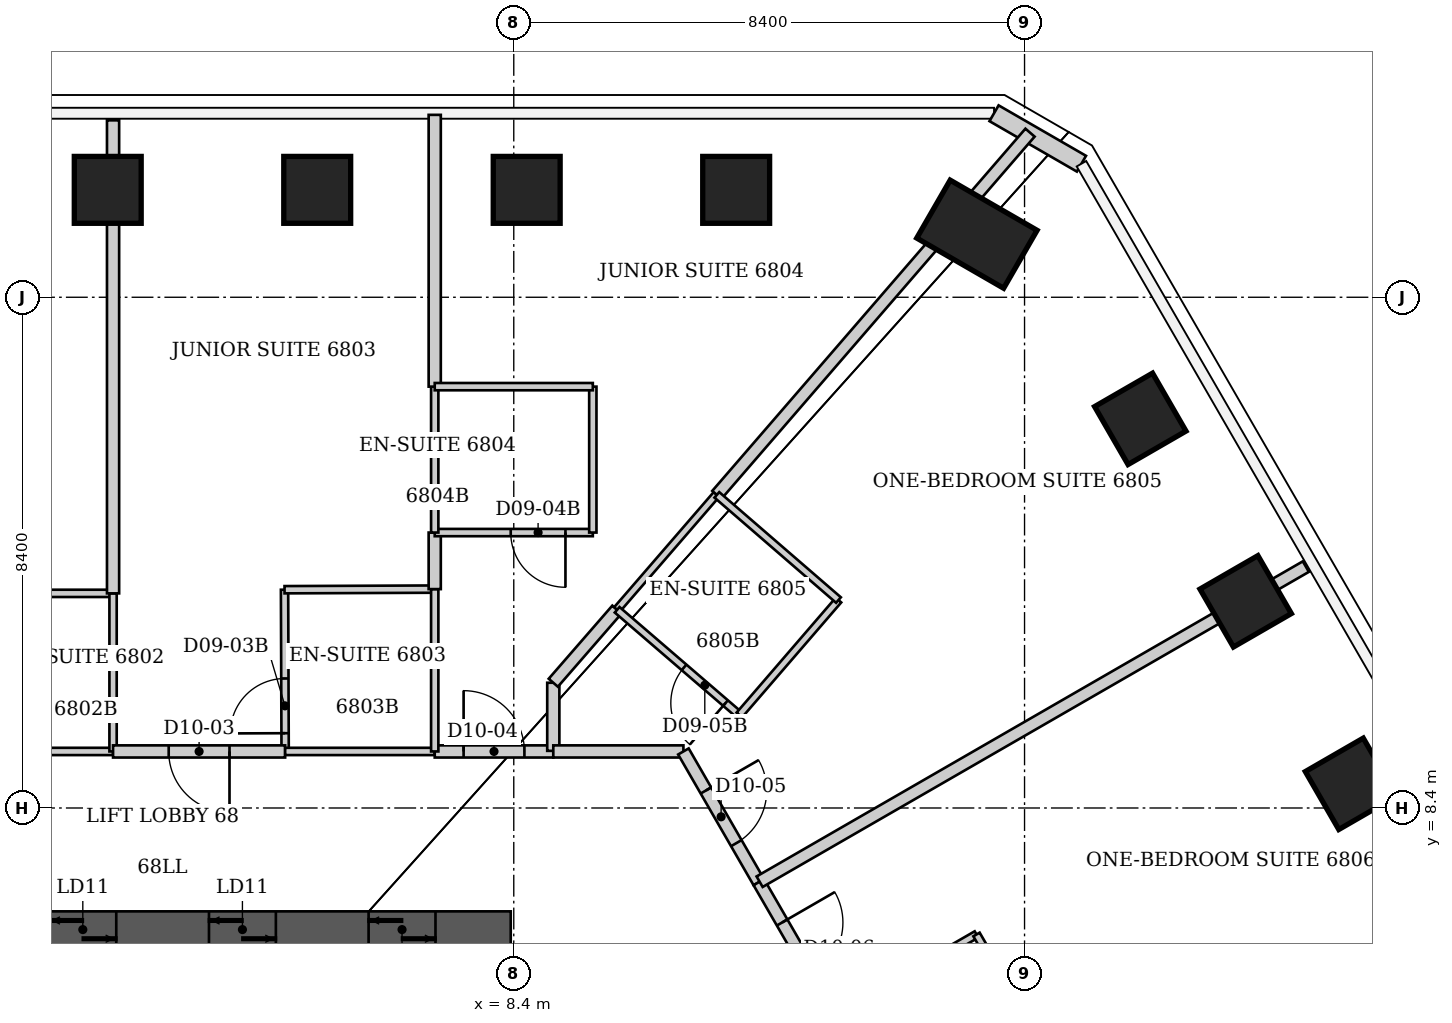
"""IFC4 building model, lengths in metres.
Left out: names, types, materials, properties, quantities, classifications, styles, units other than length and angle.
Written with IfcOpenShell. Run it as: python <this file> out.ifc"""

import sys

from ifc_helpers import new_model, si_unit, direction, frame, frame_2d, origin, origin_2d, place, context, subcontext, project, spatial, rectangle, extrude, element, fill, save


model = new_model("IFC4")
c1 = context("Model", 3, precision=1e-05, world=origin(), true_north=direction((0.0, 1.0)))
c2 = subcontext(c1, "Body", "Model", "MODEL_VIEW")
j1 = project(units=[si_unit("LENGTHUNIT", "METRE"), si_unit("PLANEANGLEUNIT", "RADIAN")], contexts=[c1])
p1 = place(None, origin())
s1 = spatial("IfcSite", under=j1, at=p1, CompositionType="ELEMENT")
p2 = place(p1, origin())
s2 = spatial("IfcBuilding", under=s1, at=p2, CompositionType="ELEMENT")
p3 = place(p2, frame((0.0, 0.0, 272.2)))
s3 = spatial("IfcBuildingStorey", under=s2, at=p3, CompositionType="ELEMENT", Elevation=272.2)
for number, where, z_axis, x_axis in (
    (1, (1.722, 18.566, 0.0), (0.0, 0.0, 1.0), (0.0, 1.0, 0.0)),
    (2, (5.167, 18.566, 0.0), (0.0, 0.0, 1.0), (0.0, 1.0, 0.0)),
    (3, (8.613, 18.566, 0.0), (0.0, 0.0, 1.0), (0.0, 1.0, 0.0)),
    (4, (12.058, 18.566, 0.0), (0.0, 0.0, 1.0), (0.0, 1.0, 0.0)),
):
    element("IfcColumn", number, at=place(p3, frame(where, z_axis=z_axis, x_axis=x_axis)), inside=s3, PredefinedType="COLUMN", context=c2, shape_type="SweptSolid", body=[
        extrude(rectangle(XDim=1.1, YDim=1.1, at=origin_2d()), origin(), (0.0, 0.0, 1.0), 3.8),
    ])
p4 = place(p3, frame((16.017, 17.837, 0.0), z_axis=(0.0, 0.0, 1.0), x_axis=(0.5, 0.866025403784, 0.0)))
e5 = element("IfcColumn", 5, at=p4, inside=s3, PredefinedType="COLUMN", context=c2, shape_type="SweptSolid", body=[
    extrude(rectangle(XDim=1.1, YDim=1.65, at=origin_2d()), origin(), (0.0, 0.0, 1.0), 3.8),
])
for number, where, z_axis, x_axis in (
    (6, (18.704, 14.8, 0.0), (0.0, 0.0, 1.0), (0.866, 0.5, 0.0)),
    (7, (20.437, 11.799, 0.0), (0.0, 0.0, 1.0), (0.866, 0.5, 0.0)),
    (8, (22.169, 8.798, 0.0), (0.0, 0.0, 1.0), (0.866, 0.5, 0.0)),
):
    element("IfcColumn", number, at=place(p3, frame(where, z_axis=z_axis, x_axis=x_axis)), inside=s3, PredefinedType="COLUMN", context=c2, shape_type="SweptSolid", body=[
        extrude(rectangle(XDim=1.1, YDim=1.1, at=origin_2d()), origin(), (0.0, 0.0, 1.0), 3.8),
    ])
p5 = place(p3, frame((-8.35, 6.4, 0.0), z_axis=(0.0, 0.0, 1.0), x_axis=(1.0, 0.0, 0.0)))
e9 = element("IfcWall", 9, at=p5, inside=s3, PredefinedType="SHEAR", context=c2, shape_type="SweptSolid", body=[
    extrude(rectangle(XDim=16.7, YDim=0.6, at=frame_2d((8.35, 0.0))), origin(), (0.0, 0.0, 1.0), 3.8),
])
p6 = place(p5, frame((6.488, 0.0, 0.0)))
e10 = element("IfcOpeningElement", 10, at=p6, cuts=e9, PredefinedType="OPENING", context=c2, shape_type="SweptSolid", body=[
    extrude(rectangle(XDim=1.1, YDim=2.1, at=frame_2d((0.55, 1.05))), frame((0.0, 0.3, 0.0), z_axis=(0.0, -1.0, 0.0), x_axis=(1.0, 0.0, 0.0)), (0.0, 0.0, 1.0), 0.6),
])
p7 = place(p5, frame((9.113, 0.0, 0.0)))
e11 = element("IfcOpeningElement", 11, at=p7, cuts=e9, PredefinedType="OPENING", context=c2, shape_type="SweptSolid", body=[
    extrude(rectangle(XDim=1.1, YDim=2.1, at=frame_2d((0.55, 1.05))), frame((0.0, 0.3, 0.0), z_axis=(0.0, -1.0, 0.0), x_axis=(1.0, 0.0, 0.0)), (0.0, 0.0, 1.0), 0.6),
])
p8 = place(p5, frame((11.738, 0.0, 0.0)))
e12 = element("IfcOpeningElement", 12, at=p8, cuts=e9, PredefinedType="OPENING", context=c2, shape_type="SweptSolid", body=[
    extrude(rectangle(XDim=1.1, YDim=2.1, at=frame_2d((0.55, 1.05))), frame((0.0, 0.3, 0.0), z_axis=(0.0, -1.0, 0.0), x_axis=(1.0, 0.0, 0.0)), (0.0, 0.0, 1.0), 0.6),
])
p9 = place(p5, frame((14.363, 0.0, 0.0)))
e13 = element("IfcOpeningElement", 13, at=p9, cuts=e9, PredefinedType="OPENING", context=c2, shape_type="SweptSolid", body=[
    extrude(rectangle(XDim=1.1, YDim=2.1, at=frame_2d((0.55, 1.05))), frame((0.0, 0.3, 0.0), z_axis=(0.0, -1.0, 0.0), x_axis=(1.0, 0.0, 0.0)), (0.0, 0.0, 1.0), 0.6),
])
p10 = place(p3, frame((16.298, 19.826, 0.0), z_axis=(0.0, 0.0, 1.0), x_axis=(0.866026405774, -0.499998264499, 0.0)))
e14 = element("IfcWall", 14, at=p10, inside=s3, PredefinedType="SOLIDWALL", context=c2, shape_type="SweptSolid", body=[
    extrude(rectangle(XDim=1.66, YDim=0.3, at=frame_2d((0.83, 0.0))), origin(), (0.0, 0.0, 1.0), 3.64),
])
p11 = place(p3, frame((1.81, 9.33, 0.0), z_axis=(0.0, 0.0, 1.0), x_axis=(-1.0, 0.0, 0.0)))
e15 = element("IfcWall", 15, at=p11, inside=s3, PredefinedType="PARTITIONING", context=c2, shape_type="SweptSolid", body=[
    extrude(rectangle(XDim=2.4, YDim=0.12, at=frame_2d((1.2, 0.0))), origin(), (0.0, 0.0, 1.0), 3.64),
])
p12 = place(p3, frame((1.81, 11.93, 0.0), z_axis=(0.0, 0.0, 1.0), x_axis=(-1.0, 0.0, 0.0)))
e16 = element("IfcWall", 16, at=p12, inside=s3, PredefinedType="PARTITIONING", context=c2, shape_type="SweptSolid", body=[
    extrude(rectangle(XDim=2.39, YDim=0.12, at=frame_2d((1.195, 0.0))), origin(), (0.0, 0.0, 1.0), 3.64),
])
p13 = place(p3, frame((1.81, 11.93, 0.0), z_axis=(0.0, 0.0, 1.0), x_axis=(0.0, -1.0, 0.0)))
e17 = element("IfcWall", 17, at=p13, inside=s3, PredefinedType="PARTITIONING", context=c2, shape_type="SweptSolid", body=[
    extrude(rectangle(XDim=2.6, YDim=0.12, at=frame_2d((1.3, 0.0))), origin(), (0.0, 0.0, 1.0), 3.023),
])
p14 = place(p3, frame((1.81, 19.71, 0.0), z_axis=(0.0, 0.0, 1.0), x_axis=(0.0, -1.0, 0.0)))
e18 = element("IfcWall", 18, at=p14, inside=s3, PredefinedType="PARTITIONING", context=c2, shape_type="SweptSolid", body=[
    extrude(rectangle(XDim=7.78, YDim=0.2, at=frame_2d((3.89, 0.0))), origin(), (0.0, 0.0, 1.0), 3.023),
])
p15 = place(p3, frame((4.63, 11.99, 0.0), z_axis=(0.0, 0.0, 1.0), x_axis=(0.00376316748, -0.99999291926, 0.0)))
e19 = element("IfcWall", 19, at=p15, inside=s3, PredefinedType="PARTITIONING", context=c2, shape_type="SweptSolid", body=[
    extrude(rectangle(XDim=2.66, YDim=0.12, at=frame_2d((1.33, 0.0))), origin(), (0.0, 0.0, 1.0), 3.64),
])
p16 = place(p15, frame((1.46, 0.0, 0.0)))
e20 = element("IfcOpeningElement", 20, at=p16, cuts=e19, PredefinedType="OPENING", context=c2, shape_type="SweptSolid", body=[
    extrude(rectangle(XDim=0.9, YDim=2.03, at=frame_2d((0.45, 1.015))), frame((0.0, 0.06, 0.0), z_axis=(0.0, -1.0, 0.0), x_axis=(1.0, 0.0, 0.0)), (0.0, 0.0, 1.0), 0.12),
])
p17 = place(p3, frame((4.64, 9.33, 0.0), z_axis=(0.0, 0.0, 1.0), x_axis=(-1.0, 0.0, 0.0)))
e21 = element("IfcWall", 21, at=p17, inside=s3, PredefinedType="PARTITIONING", context=c2, shape_type="SweptSolid", body=[
    extrude(rectangle(XDim=2.83, YDim=0.2, at=frame_2d((1.415, 0.0))), origin(), (0.0, 0.0, 1.0), 3.64),
])
p18 = place(p17, frame((0.915, 0.0, 0.0)))
e22 = element("IfcOpeningElement", 22, at=p18, cuts=e21, PredefinedType="OPENING", context=c2, shape_type="SweptSolid", body=[
    extrude(rectangle(XDim=1.0, YDim=2.13, at=frame_2d((0.5, 1.065))), frame((0.0, 0.1, 0.0), z_axis=(0.0, -1.0, 0.0), x_axis=(1.0, 0.0, 0.0)), (0.0, 0.0, 1.0), 0.2),
])
p19 = place(p3, frame((7.1, 9.33, 0.0), z_axis=(0.0, 0.0, 1.0), x_axis=(-1.0, 0.0, 0.0)))
e23 = element("IfcWall", 23, at=p19, inside=s3, PredefinedType="PARTITIONING", context=c2, shape_type="SweptSolid", body=[
    extrude(rectangle(XDim=2.46, YDim=0.12, at=frame_2d((1.23, 0.0))), origin(), (0.0, 0.0, 1.0), 3.64),
])
p20 = place(p3, frame((7.1, 9.33, 0.0), z_axis=(0.0, 0.0, 1.0), x_axis=(1.0, 0.0, 0.0)))
e24 = element("IfcWall", 24, at=p20, inside=s3, PredefinedType="PARTITIONING", context=c2, shape_type="SweptSolid", body=[
    extrude(rectangle(XDim=1.95, YDim=0.2, at=frame_2d((0.975, 0.0))), origin(), (0.0, 0.0, 1.0), 3.64),
])
p21 = place(p20, frame((0.475, 0.0, 0.0)))
e25 = element("IfcOpeningElement", 25, at=p21, cuts=e24, PredefinedType="OPENING", context=c2, shape_type="SweptSolid", body=[
    extrude(rectangle(XDim=1.0, YDim=2.13, at=frame_2d((0.5, 1.065))), frame((0.0, 0.1, 0.0), z_axis=(0.0, -1.0, 0.0), x_axis=(1.0, 0.0, 0.0)), (0.0, 0.0, 1.0), 0.2),
])
p22 = place(p3, frame((7.1, 12.0, 0.0), z_axis=(0.0, 0.0, 1.0), x_axis=(-0.99999178838, -0.00405255148, 0.0)))
e26 = element("IfcWall", 26, at=p22, inside=s3, PredefinedType="PARTITIONING", context=c2, shape_type="SweptSolid", body=[
    extrude(rectangle(XDim=2.47, YDim=0.12, at=frame_2d((1.235, 0.0))), origin(), (0.0, 0.0, 1.0), 3.64),
])
p23 = place(p3, frame((7.1, 12.0, 0.0), z_axis=(0.0, 0.0, 1.0), x_axis=(0.0, -1.0, 0.0)))
e27 = element("IfcWall", 27, at=p23, inside=s3, PredefinedType="PARTITIONING", context=c2, shape_type="SweptSolid", body=[
    extrude(rectangle(XDim=2.67, YDim=0.12, at=frame_2d((1.335, 0.0))), origin(), (0.0, 0.0, 1.0), 3.64),
])
p24 = place(p3, frame((7.1, 12.93, 0.0), z_axis=(0.0, 0.0, 1.0), x_axis=(0.0, -1.0, 0.0)))
e28 = element("IfcWall", 28, at=p24, inside=s3, PredefinedType="PARTITIONING", context=c2, shape_type="SweptSolid", body=[
    extrude(rectangle(XDim=0.93, YDim=0.2, at=frame_2d((0.465, 0.0))), origin(), (0.0, 0.0, 1.0), 3.64),
])
p25 = place(p3, frame((7.1, 12.93, 0.0), z_axis=(0.0, 0.0, 1.0), x_axis=(1.0, 0.0, 0.0)))
e29 = element("IfcWall", 29, at=p25, inside=s3, PredefinedType="PARTITIONING", context=c2, shape_type="SweptSolid", body=[
    extrude(rectangle(XDim=2.6, YDim=0.12, at=frame_2d((1.3, 0.0))), origin(), (0.0, 0.0, 1.0), 3.64),
])
p26 = place(p25, frame((1.25, 0.0, 0.0)))
e30 = element("IfcOpeningElement", 30, at=p26, cuts=e29, PredefinedType="OPENING", context=c2, shape_type="SweptSolid", body=[
    extrude(rectangle(XDim=0.9, YDim=2.03, at=frame_2d((0.45, 1.015))), frame((0.0, 0.06, 0.0), z_axis=(0.0, -1.0, 0.0), x_axis=(1.0, 0.0, 0.0)), (0.0, 0.0, 1.0), 0.12),
])
p27 = place(p3, frame((7.1, 15.33, 0.0), z_axis=(0.0, 0.0, 1.0), x_axis=(0.0, -1.0, 0.0)))
e31 = element("IfcWall", 31, at=p27, inside=s3, PredefinedType="PARTITIONING", context=c2, shape_type="SweptSolid", body=[
    extrude(rectangle(XDim=2.4, YDim=0.12, at=frame_2d((1.2, 0.0))), origin(), (0.0, 0.0, 1.0), 3.64),
])
p28 = place(p3, frame((7.1, 19.8, 0.0), z_axis=(0.0, 0.0, 1.0), x_axis=(0.0, -1.0, 0.0)))
e32 = element("IfcWall", 32, at=p28, inside=s3, PredefinedType="PARTITIONING", context=c2, shape_type="SweptSolid", body=[
    extrude(rectangle(XDim=4.47, YDim=0.2, at=frame_2d((2.235, 0.0))), origin(), (0.0, 0.0, 1.0), 3.64),
])
p29 = place(p3, frame((9.05, 10.46, 0.0), z_axis=(0.0, 0.0, 1.0), x_axis=(0.0, -1.0, 0.0)))
e33 = element("IfcWall", 33, at=p29, inside=s3, PredefinedType="PARTITIONING", context=c2, shape_type="SweptSolid", body=[
    extrude(rectangle(XDim=1.12, YDim=0.2, at=frame_2d((0.56, 0.0))), origin(), (0.0, 0.0, 1.0), 3.64),
])
p30 = place(p3, frame((9.05, 10.46, 0.0), z_axis=(0.0, 0.0, 1.0), x_axis=(0.656083941969, 0.754687922979, 0.0)))
e34 = element("IfcWall", 34, at=p30, inside=s3, PredefinedType="PARTITIONING", context=c2, shape_type="SweptSolid", body=[
    extrude(rectangle(XDim=1.594, YDim=0.2, at=frame_2d((0.797, 0.0))), origin(), (0.0, 0.0, 1.0), 3.64),
])
p31 = place(p3, frame((9.7, 12.93, 0.0), z_axis=(0.0, 0.0, 1.0), x_axis=(0.0, 1.0, 0.0)))
e35 = element("IfcWall", 35, at=p31, inside=s3, PredefinedType="PARTITIONING", context=c2, shape_type="SweptSolid", body=[
    extrude(rectangle(XDim=2.4, YDim=0.12, at=frame_2d((1.2, 0.0))), origin(), (0.0, 0.0, 1.0), 3.64),
])
p32 = place(p3, frame((9.7, 15.33, 0.0), z_axis=(0.0, 0.0, 1.0), x_axis=(-1.0, 0.0, 0.0)))
e36 = element("IfcWall", 36, at=p32, inside=s3, PredefinedType="PARTITIONING", context=c2, shape_type="SweptSolid", body=[
    extrude(rectangle(XDim=2.6, YDim=0.12, at=frame_2d((1.3, 0.0))), origin(), (0.0, 0.0, 1.0), 3.64),
])
p33 = place(p3, frame((10.096, 11.663, 0.0), z_axis=(0.0, 0.0, 1.0), x_axis=(0.654079520224, 0.7564257936, 0.0)))
e37 = element("IfcWall", 37, at=p33, inside=s3, PredefinedType="PARTITIONING", context=c2, shape_type="SweptSolid", body=[
    extrude(rectangle(XDim=2.502, YDim=0.12, at=frame_2d((1.251, 0.0))), origin(), (0.0, 0.0, 1.0), 3.64),
])
p34 = place(p3, frame((10.1, 11.66, 0.0), z_axis=(0.0, 0.0, 1.0), x_axis=(0.757929364221, -0.652336630009, 0.0)))
e38 = element("IfcWall", 38, at=p34, inside=s3, PredefinedType="PARTITIONING", context=c2, shape_type="SweptSolid", body=[
    extrude(rectangle(XDim=2.652, YDim=0.12, at=frame_2d((1.326, 0.0))), origin(), (0.0, 0.0, 1.0), 3.64),
])
p35 = place(p34, frame((1.452, 0.0, 0.0)))
e39 = element("IfcOpeningElement", 39, at=p35, cuts=e38, PredefinedType="OPENING", context=c2, shape_type="SweptSolid", body=[
    extrude(rectangle(XDim=0.9, YDim=2.03, at=frame_2d((0.45, 1.015))), frame((0.0, 0.06, 0.0), z_axis=(0.0, -1.0, 0.0), x_axis=(1.0, 0.0, 0.0)), (0.0, 0.0, 1.0), 0.12),
])
p36 = place(p3, frame((11.19, 9.33, 0.0), z_axis=(0.0, 0.0, 1.0), x_axis=(-1.0, 0.0, 0.0)))
e40 = element("IfcWall", 40, at=p36, inside=s3, PredefinedType="PARTITIONING", context=c2, shape_type="SweptSolid", body=[
    extrude(rectangle(XDim=2.14, YDim=0.2, at=frame_2d((1.07, 0.0))), origin(), (0.0, 0.0, 1.0), 3.64),
])
p37 = place(p3, frame((11.19, 9.33, 0.0), z_axis=(0.0, 0.0, 1.0), x_axis=(0.499577688184, -0.866269088372, 0.0)))
e41 = element("IfcWall", 41, at=p37, inside=s3, PredefinedType="PARTITIONING", context=c2, shape_type="SweptSolid", body=[
    extrude(rectangle(XDim=2.482, YDim=0.2, at=frame_2d((1.241, 0.0))), origin(), (0.0, 0.0, 1.0), 3.64),
])
p38 = place(p37, frame((0.741, 0.0, 0.0)))
e42 = element("IfcOpeningElement", 42, at=p38, cuts=e41, PredefinedType="OPENING", context=c2, shape_type="SweptSolid", body=[
    extrude(rectangle(XDim=1.0, YDim=2.13, at=frame_2d((0.5, 1.065))), frame((0.0, 0.1, 0.0), z_axis=(0.0, -1.0, 0.0), x_axis=(1.0, 0.0, 0.0)), (0.0, 0.0, 1.0), 0.2),
])
p39 = place(p3, frame((11.74, 13.55, 0.0), z_axis=(0.0, 0.0, 1.0), x_axis=(0.654017705967, 0.756479239822, 0.0)))
e43 = element("IfcWall", 43, at=p39, inside=s3, PredefinedType="PARTITIONING", context=c2, shape_type="SweptSolid", body=[
    extrude(rectangle(XDim=7.875, YDim=0.2, at=frame_2d((3.938, 0.0))), origin(), (0.0, 0.0, 1.0), 3.64),
])
p40 = place(p3, frame((12.11, 9.93, 0.0), z_axis=(0.0, 0.0, 1.0), x_axis=(0.65304410808, 0.757319874889, 0.0)))
e44 = element("IfcWall", 44, at=p40, inside=s3, PredefinedType="PARTITIONING", context=c2, shape_type="SweptSolid", body=[
    extrude(rectangle(XDim=2.496, YDim=0.12, at=frame_2d((1.248, 0.0))), origin(), (0.0, 0.0, 1.0), 3.64),
])
p41 = place(p3, frame((12.43, 7.18, 0.0), z_axis=(0.0, 0.0, 1.0), x_axis=(0.500329012441, -0.865835365015, 0.0)))
e45 = element("IfcWall", 45, at=p41, inside=s3, PredefinedType="PARTITIONING", context=c2, shape_type="SweptSolid", body=[
    extrude(rectangle(XDim=2.531, YDim=0.2, at=frame_2d((1.266, 0.0))), origin(), (0.0, 0.0, 1.0), 3.64),
])
p42 = place(p41, frame((0.766, 0.0, 0.0)))
e46 = element("IfcOpeningElement", 46, at=p42, cuts=e45, PredefinedType="OPENING", context=c2, shape_type="SweptSolid", body=[
    extrude(rectangle(XDim=1.0, YDim=2.13, at=frame_2d((0.5, 1.065))), frame((0.0, 0.1, 0.0), z_axis=(0.0, -1.0, 0.0), x_axis=(1.0, 0.0, 0.0)), (0.0, 0.0, 1.0), 0.2),
])
p43 = place(p3, frame((13.74, 11.82, 0.0), z_axis=(0.0, 0.0, 1.0), x_axis=(-0.756316256301, 0.6542061758, 0.0)))
e47 = element("IfcWall", 47, at=p43, inside=s3, PredefinedType="PARTITIONING", context=c2, shape_type="SweptSolid", body=[
    extrude(rectangle(XDim=2.644, YDim=0.12, at=frame_2d((1.322, 0.0))), origin(), (0.0, 0.0, 1.0), 3.64),
])
p44 = place(p3, frame((16.01, 6.32, 0.0), z_axis=(0.0, 0.0, 1.0), x_axis=(-0.866615255992, -0.498976951453, 0.0)))
e48 = element("IfcWall", 48, at=p44, inside=s3, PredefinedType="PARTITIONING", context=c2, shape_type="SweptSolid", body=[
    extrude(rectangle(XDim=2.666, YDim=0.12, at=frame_2d((1.333, 0.0))), origin(), (0.0, 0.0, 1.0), 3.64),
])
p45 = place(p44, frame((1.466, 0.0, 0.0)))
e49 = element("IfcOpeningElement", 49, at=p45, cuts=e48, PredefinedType="OPENING", context=c2, shape_type="SweptSolid", body=[
    extrude(rectangle(XDim=0.9, YDim=2.03, at=frame_2d((0.45, 1.015))), frame((0.0, 0.06, 0.0), z_axis=(0.0, -1.0, 0.0), x_axis=(1.0, 0.0, 0.0)), (0.0, 0.0, 1.0), 0.12),
])
p46 = place(p3, frame((17.26, 4.16, 0.0), z_axis=(0.0, 0.0, 1.0), x_axis=(-0.500851167559, 0.865533423938, 0.0)))
e50 = element("IfcWall", 50, at=p46, inside=s3, PredefinedType="PARTITIONING", context=c2, shape_type="SweptSolid", body=[
    extrude(rectangle(XDim=2.496, YDim=0.12, at=frame_2d((1.248, 0.0))), origin(), (0.0, 0.0, 1.0), 3.64),
])
p47 = place(p3, frame((21.426, 12.37, 0.0), z_axis=(0.0, 0.0, 1.0), x_axis=(-0.866178531411, -0.499734681328, 0.0)))
e51 = element("IfcWall", 51, at=p47, inside=s3, PredefinedType="PARTITIONING", context=c2, shape_type="SweptSolid", body=[
    extrude(rectangle(XDim=10.371, YDim=0.2, at=frame_2d((5.186, 0.0))), origin(), (0.0, 0.0, 1.0), 2.878),
])
p48 = place(p18, origin())
e52 = element("IfcDoor", 52, at=p48, inside=s3, OperationType="SINGLE_SWING_LEFT", PredefinedType="DOOR", context=c2, shape_type="SweptSolid", body=[
    extrude(rectangle(XDim=1.0, YDim=2.13, at=frame_2d((0.5, 1.065))), frame((0.0, 0.025, 0.0), z_axis=(0.0, -1.0, 0.0), x_axis=(1.0, 0.0, 0.0)), (0.0, 0.0, 1.0), 0.05),
])
fill(e22, e52)
p49 = place(p16, origin())
e53 = element("IfcDoor", 53, at=p49, inside=s3, OperationType="SINGLE_SWING_RIGHT", PredefinedType="DOOR", context=c2, shape_type="SweptSolid", body=[
    extrude(rectangle(XDim=0.9, YDim=2.03, at=frame_2d((0.45, 1.015))), frame((0.0, 0.025, 0.0), z_axis=(0.0, -1.0, 0.0), x_axis=(1.0, 0.0, 0.0)), (0.0, 0.0, 1.0), 0.05),
])
fill(e20, e53)
p50 = place(p21, origin())
e54 = element("IfcDoor", 54, at=p50, inside=s3, OperationType="SINGLE_SWING_LEFT", PredefinedType="DOOR", context=c2, shape_type="SweptSolid", body=[
    extrude(rectangle(XDim=1.0, YDim=2.13, at=frame_2d((0.5, 1.065))), frame((0.0, 0.025, 0.0), z_axis=(0.0, -1.0, 0.0), x_axis=(1.0, 0.0, 0.0)), (0.0, 0.0, 1.0), 0.05),
])
fill(e25, e54)
p51 = place(p26, origin())
e55 = element("IfcDoor", 55, at=p51, inside=s3, OperationType="SINGLE_SWING_RIGHT", PredefinedType="DOOR", context=c2, shape_type="SweptSolid", body=[
    extrude(rectangle(XDim=0.9, YDim=2.03, at=frame_2d((0.45, 1.015))), frame((0.0, 0.025, 0.0), z_axis=(0.0, -1.0, 0.0), x_axis=(1.0, 0.0, 0.0)), (0.0, 0.0, 1.0), 0.05),
])
fill(e30, e55)
p52 = place(p38, origin())
e56 = element("IfcDoor", 56, at=p52, inside=s3, OperationType="SINGLE_SWING_LEFT", PredefinedType="DOOR", context=c2, shape_type="SweptSolid", body=[
    extrude(rectangle(XDim=1.0, YDim=2.13, at=frame_2d((0.5, 1.065))), frame((0.0, 0.025, 0.0), z_axis=(0.0, -1.0, 0.0), x_axis=(1.0, 0.0, 0.0)), (0.0, 0.0, 1.0), 0.05),
])
fill(e42, e56)
p53 = place(p35, origin())
e57 = element("IfcDoor", 57, at=p53, inside=s3, OperationType="SINGLE_SWING_RIGHT", PredefinedType="DOOR", context=c2, shape_type="SweptSolid", body=[
    extrude(rectangle(XDim=0.9, YDim=2.03, at=frame_2d((0.45, 1.015))), frame((0.0, 0.025, 0.0), z_axis=(0.0, -1.0, 0.0), x_axis=(1.0, 0.0, 0.0)), (0.0, 0.0, 1.0), 0.05),
])
fill(e39, e57)
p54 = place(p42, origin())
e58 = element("IfcDoor", 58, at=p54, inside=s3, OperationType="SINGLE_SWING_LEFT", PredefinedType="DOOR", context=c2, shape_type="SweptSolid", body=[
    extrude(rectangle(XDim=1.0, YDim=2.13, at=frame_2d((0.5, 1.065))), frame((0.0, 0.025, 0.0), z_axis=(0.0, -1.0, 0.0), x_axis=(1.0, 0.0, 0.0)), (0.0, 0.0, 1.0), 0.05),
])
fill(e46, e58)
p55 = place(p7, origin())
e59 = element("IfcDoor", 59, at=p55, inside=s3, OperationType="DOUBLE_DOOR_SLIDING", PredefinedType="DOOR", context=c2, shape_type="SweptSolid", body=[
    extrude(rectangle(XDim=1.1, YDim=2.1, at=frame_2d((0.55, 1.05))), frame((0.0, 0.025, 0.0), z_axis=(0.0, -1.0, 0.0), x_axis=(1.0, 0.0, 0.0)), (0.0, 0.0, 1.0), 0.05),
])
fill(e11, e59)
p56 = place(p8, origin())
e60 = element("IfcDoor", 60, at=p56, inside=s3, OperationType="DOUBLE_DOOR_SLIDING", PredefinedType="DOOR", context=c2, shape_type="SweptSolid", body=[
    extrude(rectangle(XDim=1.1, YDim=2.1, at=frame_2d((0.55, 1.05))), frame((0.0, 0.025, 0.0), z_axis=(0.0, -1.0, 0.0), x_axis=(1.0, 0.0, 0.0)), (0.0, 0.0, 1.0), 0.05),
])
fill(e12, e60)
p57 = place(p9, origin())
e61 = element("IfcDoor", 61, at=p57, inside=s3, OperationType="DOUBLE_DOOR_SLIDING", PredefinedType="DOOR", context=c2, shape_type="SweptSolid", body=[
    extrude(rectangle(XDim=1.1, YDim=2.1, at=frame_2d((0.55, 1.05))), frame((0.0, 0.025, 0.0), z_axis=(0.0, -1.0, 0.0), x_axis=(1.0, 0.0, 0.0)), (0.0, 0.0, 1.0), 0.05),
])
fill(e13, e61)
save(model, sys.argv[1])
